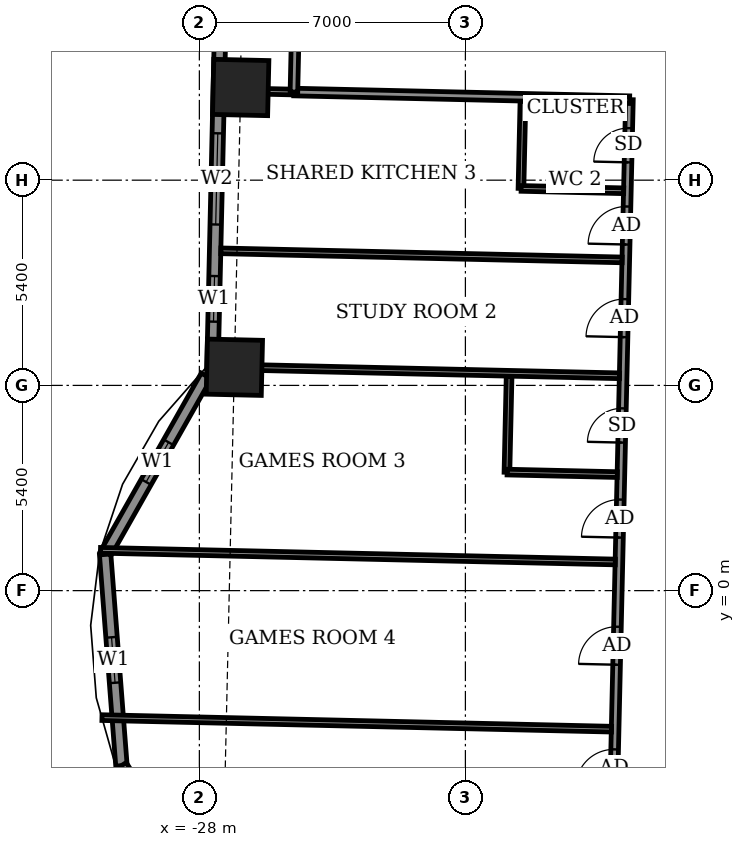
"""IFC4 building model, lengths in metres.
Left out: names, types, materials, properties, quantities, classifications, styles, units other than length and angle.
Written with IfcOpenShell. Run it as: python <this file> out.ifc"""

import sys

from ifc_helpers import new_model, si_unit, direction, frame, frame_2d, origin, origin_2d, place, context, subcontext, project, spatial, rectangle, extrude, element, fill, save


model = new_model("IFC4")
c1 = context("Model", 3, precision=1e-05, world=origin(), true_north=direction((0.0, 1.0)))
c2 = subcontext(c1, "Body", "Model", "MODEL_VIEW")
j1 = project(units=[si_unit("LENGTHUNIT", "METRE"), si_unit("PLANEANGLEUNIT", "RADIAN")], contexts=[c1])
p1 = place(None, origin())
s1 = spatial("IfcSite", under=j1, at=p1, CompositionType="ELEMENT")
p2 = place(p1, origin())
s2 = spatial("IfcBuilding", under=s1, at=p2, CompositionType="ELEMENT")
p3 = place(p2, frame((0.0, 0.0, 71.1)))
s3 = spatial("IfcBuildingStorey", under=s2, at=p3, CompositionType="ELEMENT", Elevation=71.1)
for number, where, z_axis, x_axis in (
    (1, (-26.912, 13.239, -0.55), (0.0, 0.0, 1.0), (-0.023, -1.0, 0.0)),
    (2, (-27.079, 5.877, -0.55), (0.0, 0.0, 1.0), (-0.023, -1.0, 0.0)),
):
    element("IfcColumn", number, at=place(p3, frame(where, z_axis=z_axis, x_axis=x_axis)), inside=s3, PredefinedType="COLUMN", context=c2, shape_type="SweptSolid", body=[
        extrude(rectangle(XDim=1.45, YDim=1.45, at=origin_2d()), origin(), (0.0, 0.0, 1.0), 3.6),
    ])
p4 = place(p3, frame((-27.324, 20.462, 0.0), z_axis=(0.0, 0.0, 1.0), x_axis=(-0.022695628174, -0.999742421057, 0.0)))
e3 = element("IfcWall", 3, at=p4, inside=s3, PredefinedType="SOLIDWALL", context=c2, shape_type="SweptSolid", body=[
    extrude(rectangle(XDim=14.63, YDim=0.3, at=frame_2d((7.315, 0.0))), origin(), (0.0, 0.0, 1.0), 3.05),
])
p5 = place(p4, frame((3.118, 0.0, 0.0)))
e4 = element("IfcOpeningElement", 4, at=p5, cuts=e3, PredefinedType="OPENING", context=c2, shape_type="SweptSolid", body=[
    extrude(rectangle(XDim=1.5, YDim=2.4, at=frame_2d((0.75, 1.2))), frame((0.0, 0.16, 0.0), z_axis=(0.0, -1.0, 0.0), x_axis=(1.0, 0.0, 0.0)), (0.0, 0.0, 1.0), 0.32),
])
p6 = place(p4, frame((8.431, 0.0, 0.9)))
e5 = element("IfcOpeningElement", 5, at=p6, cuts=e3, PredefinedType="OPENING", context=c2, shape_type="SweptSolid", body=[
    extrude(rectangle(XDim=2.4, YDim=1.5, at=frame_2d((1.2, 0.75))), frame((0.0, 0.16, 0.0), z_axis=(0.0, -1.0, 0.0), x_axis=(1.0, 0.0, 0.0)), (0.0, 0.0, 1.0), 0.32),
])
p7 = place(p4, frame((12.188, 0.0, 0.9)))
e6 = element("IfcOpeningElement", 6, at=p7, cuts=e3, PredefinedType="OPENING", context=c2, shape_type="SweptSolid", body=[
    extrude(rectangle(XDim=1.2, YDim=1.5, at=frame_2d((0.6, 0.75))), frame((0.0, 0.16, 0.0), z_axis=(0.0, -1.0, 0.0), x_axis=(1.0, 0.0, 0.0)), (0.0, 0.0, 1.0), 0.32),
])
p8 = place(p3, frame((-27.82, 5.65, 0.0), z_axis=(0.0, 0.0, 1.0), x_axis=(-0.492554919955, -0.870281363025, 0.0)))
e7 = element("IfcWall", 7, at=p8, inside=s3, PredefinedType="SOLIDWALL", context=c2, shape_type="SweptSolid", body=[
    extrude(rectangle(XDim=5.398, YDim=0.3, at=frame_2d((2.699, 0.0))), origin(), (0.0, 0.0, 1.0), 3.05),
])
p9 = place(p8, frame((2.008, 0.0, 0.9)))
e8 = element("IfcOpeningElement", 8, at=p9, cuts=e7, PredefinedType="OPENING", context=c2, shape_type="SweptSolid", body=[
    extrude(rectangle(XDim=1.2, YDim=1.5, at=frame_2d((0.6, 0.75))), frame((0.0, 0.16, 0.0), z_axis=(0.0, -1.0, 0.0), x_axis=(1.0, 0.0, 0.0)), (0.0, 0.0, 1.0), 0.32),
])
p10 = place(p3, frame((-30.479, 0.952, 0.0), z_axis=(0.0, 0.0, 1.0), x_axis=(0.076964476481, -0.997033835614, 0.0)))
e9 = element("IfcWall", 9, at=p10, inside=s3, PredefinedType="SOLIDWALL", context=c2, shape_type="SweptSolid", body=[
    extrude(rectangle(XDim=5.573, YDim=0.3, at=frame_2d((2.787, 0.0))), origin(), (0.0, 0.0, 1.0), 3.05),
])
p11 = place(p10, frame((2.186, 0.0, 0.9)))
e10 = element("IfcOpeningElement", 10, at=p11, cuts=e9, PredefinedType="OPENING", context=c2, shape_type="SweptSolid", body=[
    extrude(rectangle(XDim=1.2, YDim=1.5, at=frame_2d((0.6, 0.75))), frame((0.0, 0.16, 0.0), z_axis=(0.0, -1.0, 0.0), x_axis=(1.0, 0.0, 0.0)), (0.0, 0.0, 1.0), 0.32),
])
p12 = place(p3, frame((-30.05, -4.605, 0.0), z_axis=(0.0, 0.0, 1.0), x_axis=(0.540653885242, -0.841245134532, 0.0)))
e11 = element("IfcWall", 11, at=p12, inside=s3, PredefinedType="SOLIDWALL", context=c2, shape_type="SweptSolid", body=[
    extrude(rectangle(XDim=3.57, YDim=0.3, at=frame_2d((1.785, 0.0))), origin(), (0.0, 0.0, 1.0), 3.05),
])
p13 = place(p12, frame((0.338, 0.0, 0.9)))
e12 = element("IfcOpeningElement", 12, at=p13, cuts=e11, PredefinedType="OPENING", context=c2, shape_type="SweptSolid", body=[
    extrude(rectangle(XDim=1.2, YDim=1.5, at=frame_2d((0.6, 0.75))), frame((0.0, 0.16, 0.0), z_axis=(0.0, -1.0, 0.0), x_axis=(1.0, 0.0, 0.0)), (0.0, 0.0, 1.0), 0.32),
])
p14 = place(p3, frame((-30.413, 6.204, 0.0), z_axis=(0.0, 0.0, 1.0), x_axis=(0.022745736617, 0.999741282265, 0.0)))
e13 = element("IfcWall", 13, at=p14, inside=s3, PredefinedType="USERDEFINED", context=c2, shape_type="SweptSolid", body=[
    extrude(rectangle(XDim=3.875, YDim=0.55, at=frame_2d((1.938, 0.0))), origin(), (0.0, 0.0, 1.0), 0.8),
])
p15 = place(p3, frame((-17.287, -13.625, 0.0), z_axis=(0.0, 0.0, 1.0), x_axis=(0.022712214871, 0.999742044377, 0.0)))
e14 = element("IfcWall", 14, at=p15, inside=s3, PredefinedType="PARTITIONING", context=c2, shape_type="SweptSolid", body=[
    extrude(rectangle(XDim=26.551, YDim=0.2, at=frame_2d((13.275, 0.0))), origin(), (0.0, 0.0, 1.0), 3.05),
])
p16 = place(p15, frame((22.738, 0.0, 0.0)))
e15 = element("IfcOpeningElement", 15, at=p16, cuts=e14, PredefinedType="OPENING", context=c2, shape_type="SweptSolid", body=[
    extrude(rectangle(XDim=1.0, YDim=2.1, at=frame_2d((0.5, 1.05))), frame((0.0, 0.11, 0.0), z_axis=(0.0, -1.0, 0.0), x_axis=(1.0, 0.0, 0.0)), (0.0, 0.0, 1.0), 0.22),
])
p17 = place(p15, frame((24.9, 0.0, 0.0)))
e16 = element("IfcOpeningElement", 16, at=p17, cuts=e14, PredefinedType="OPENING", context=c2, shape_type="SweptSolid", body=[
    extrude(rectangle(XDim=0.9, YDim=2.1, at=frame_2d((0.45, 1.05))), frame((0.0, 0.11, 0.0), z_axis=(0.0, -1.0, 0.0), x_axis=(1.0, 0.0, 0.0)), (0.0, 0.0, 1.0), 0.22),
])
p18 = place(p15, frame((20.3, 0.0, 0.0)))
e17 = element("IfcOpeningElement", 17, at=p18, cuts=e14, PredefinedType="OPENING", context=c2, shape_type="SweptSolid", body=[
    extrude(rectangle(XDim=1.0, YDim=2.1, at=frame_2d((0.5, 1.05))), frame((0.0, 0.11, 0.0), z_axis=(0.0, -1.0, 0.0), x_axis=(1.0, 0.0, 0.0)), (0.0, 0.0, 1.0), 0.22),
])
p19 = place(p15, frame((15.025, 0.0, 0.0)))
e18 = element("IfcOpeningElement", 18, at=p19, cuts=e14, PredefinedType="OPENING", context=c2, shape_type="SweptSolid", body=[
    extrude(rectangle(XDim=1.0, YDim=2.1, at=frame_2d((0.5, 1.05))), frame((0.0, 0.11, 0.0), z_axis=(0.0, -1.0, 0.0), x_axis=(1.0, 0.0, 0.0)), (0.0, 0.0, 1.0), 0.22),
])
p20 = place(p15, frame((17.525, 0.0, 0.0)))
e19 = element("IfcOpeningElement", 19, at=p20, cuts=e14, PredefinedType="OPENING", context=c2, shape_type="SweptSolid", body=[
    extrude(rectangle(XDim=0.9, YDim=2.1, at=frame_2d((0.45, 1.05))), frame((0.0, 0.11, 0.0), z_axis=(0.0, -1.0, 0.0), x_axis=(1.0, 0.0, 0.0)), (0.0, 0.0, 1.0), 0.22),
])
p21 = place(p15, frame((11.678, 0.0, 0.0)))
e20 = element("IfcOpeningElement", 20, at=p21, cuts=e14, PredefinedType="OPENING", context=c2, shape_type="SweptSolid", body=[
    extrude(rectangle(XDim=1.0, YDim=2.1, at=frame_2d((0.5, 1.05))), frame((0.0, 0.11, 0.0), z_axis=(0.0, -1.0, 0.0), x_axis=(1.0, 0.0, 0.0)), (0.0, 0.0, 1.0), 0.22),
])
p22 = place(p15, frame((8.45, 0.0, 0.0)))
e21 = element("IfcOpeningElement", 21, at=p22, cuts=e14, PredefinedType="OPENING", context=c2, shape_type="SweptSolid", body=[
    extrude(rectangle(XDim=1.0, YDim=2.1, at=frame_2d((0.5, 1.05))), frame((0.0, 0.11, 0.0), z_axis=(0.0, -1.0, 0.0), x_axis=(1.0, 0.0, 0.0)), (0.0, 0.0, 1.0), 0.22),
])
p23 = place(p15, frame((6.275, 0.0, 0.0)))
e22 = element("IfcOpeningElement", 22, at=p23, cuts=e14, PredefinedType="OPENING", context=c2, shape_type="SweptSolid", body=[
    extrude(rectangle(XDim=0.9, YDim=2.1, at=frame_2d((0.45, 1.05))), frame((0.0, 0.11, 0.0), z_axis=(0.0, -1.0, 0.0), x_axis=(1.0, 0.0, 0.0)), (0.0, 0.0, 1.0), 0.22),
])
p24 = place(p15, frame((1.062, 0.0, 0.0)))
e23 = element("IfcOpeningElement", 23, at=p24, cuts=e14, PredefinedType="OPENING", context=c2, shape_type="SweptSolid", body=[
    extrude(rectangle(XDim=1.0, YDim=2.1, at=frame_2d((0.5, 1.05))), frame((0.0, 0.11, 0.0), z_axis=(0.0, -1.0, 0.0), x_axis=(1.0, 0.0, 0.0)), (0.0, 0.0, 1.0), 0.22),
])
p25 = place(p15, frame((3.875, 0.0, 0.0)))
e24 = element("IfcOpeningElement", 24, at=p25, cuts=e14, PredefinedType="OPENING", context=c2, shape_type="SweptSolid", body=[
    extrude(rectangle(XDim=0.9, YDim=2.1, at=frame_2d((0.45, 1.05))), frame((0.0, 0.11, 0.0), z_axis=(0.0, -1.0, 0.0), x_axis=(1.0, 0.0, 0.0)), (0.0, 0.0, 1.0), 0.22),
])
p26 = place(p3, frame((-30.563, -3.341, 0.0), z_axis=(0.0, 0.0, 1.0), x_axis=(0.999743140217, -0.022663927048, 0.0)))
e25 = element("IfcWall", 25, at=p26, inside=s3, PredefinedType="PARTITIONING", context=c2, shape_type="SweptSolid", body=[
    extrude(rectangle(XDim=13.411, YDim=0.15, at=frame_2d((6.706, 0.0))), origin(), (0.0, 0.0, 1.0), 2.05),
])
p27 = place(p3, frame((-30.602, 1.061, 0.0), z_axis=(0.0, 0.0, 1.0), x_axis=(0.999743108275, -0.022665336016, 0.0)))
e26 = element("IfcWall", 26, at=p27, inside=s3, PredefinedType="PARTITIONING", context=c2, shape_type="SweptSolid", body=[
    extrude(rectangle(XDim=13.551, YDim=0.15, at=frame_2d((6.775, 0.0))), origin(), (0.0, 0.0, 1.0), 2.05),
])
p28 = place(p3, frame((-19.907, 3.114, 0.0), z_axis=(0.0, 0.0, 1.0), x_axis=(0.022523775833, 0.999746307581, 0.0)))
e27 = element("IfcWall", 27, at=p28, inside=s3, PredefinedType="PARTITIONING", context=c2, shape_type="SweptSolid", body=[
    extrude(rectangle(XDim=2.526, YDim=0.15, at=frame_2d((1.263, 0.0))), origin(), (0.0, 0.0, 1.0), 3.05),
])
p29 = place(p3, frame((-19.902, 3.119, 0.0), z_axis=(0.0, 0.0, 1.0), x_axis=(0.999741618182, -0.022730967319, 0.0)))
e28 = element("IfcWall", 28, at=p29, inside=s3, PredefinedType="PARTITIONING", context=c2, shape_type="SweptSolid", body=[
    extrude(rectangle(XDim=2.9, YDim=0.15, at=frame_2d((1.45, 0.0))), origin(), (0.0, 0.0, 1.0), 3.05),
])
p30 = place(p3, frame((-27.505, 5.892, 0.0), z_axis=(0.0, 0.0, 1.0), x_axis=(0.999743990669, -0.022626381091, 0.0)))
e29 = element("IfcWall", 29, at=p30, inside=s3, PredefinedType="PARTITIONING", context=c2, shape_type="SweptSolid", body=[
    extrude(rectangle(XDim=10.563, YDim=0.15, at=frame_2d((5.282, 0.0))), origin(), (0.0, 0.0, 1.0), 3.05),
])
p31 = place(p3, frame((-27.435, 8.941, 0.0), z_axis=(0.0, 0.0, 1.0), x_axis=(0.999743955169, -0.022627949603, 0.0)))
e30 = element("IfcWall", 30, at=p31, inside=s3, PredefinedType="PARTITIONING", context=c2, shape_type="SweptSolid", body=[
    extrude(rectangle(XDim=10.563, YDim=0.15, at=frame_2d((5.281, 0.0))), origin(), (0.0, 0.0, 1.0), 2.55),
])
p32 = place(p3, frame((-19.538, 10.583, 0.0), z_axis=(0.0, 0.0, 1.0), x_axis=(0.022612884682, 0.999744296031, 0.0)))
e31 = element("IfcWall", 31, at=p32, inside=s3, PredefinedType="PARTITIONING", context=c2, shape_type="SweptSolid", body=[
    extrude(rectangle(XDim=2.3, YDim=0.15, at=frame_2d((1.15, 0.0))), origin(), (0.0, 0.0, 1.0), 3.05),
])
p33 = place(p3, frame((-19.533, 10.583, 0.0), z_axis=(0.0, 0.0, 1.0), x_axis=(0.999736155505, -0.022969966847, 0.0)))
e32 = element("IfcWall", 32, at=p33, inside=s3, PredefinedType="PARTITIONING", context=c2, shape_type="SweptSolid", body=[
    extrude(rectangle(XDim=2.7, YDim=0.15, at=frame_2d((1.35, 0.0))), origin(), (0.0, 0.0, 1.0), 3.05),
])
p34 = place(p3, frame((-27.34, 13.16, 0.0), z_axis=(0.0, 0.0, 1.0), x_axis=(0.999748678707, -0.022418283238, 0.0)))
e33 = element("IfcWall", 33, at=p34, inside=s3, PredefinedType="PARTITIONING", context=c2, shape_type="SweptSolid", body=[
    extrude(rectangle(XDim=1.83, YDim=0.15, at=frame_2d((0.915, 0.0))), origin(), (0.0, 0.0, 1.0), 3.05),
])
p35 = place(p3, frame((-25.515, 13.119, 0.0), z_axis=(0.0, 0.0, 1.0), x_axis=(0.999741550249, -0.022733954903, 0.0)))
e34 = element("IfcWall", 34, at=p35, inside=s3, PredefinedType="PARTITIONING", context=c2, shape_type="SweptSolid", body=[
    extrude(rectangle(XDim=8.838, YDim=0.2, at=frame_2d((4.419, 0.0))), origin(), (0.0, 0.0, 1.0), 3.05),
])
p36 = place(p3, frame((-25.512, 13.119, 0.0), z_axis=(0.0, 0.0, 1.0), x_axis=(0.022617910375, 0.999744182344, 0.0)))
e35 = element("IfcWall", 35, at=p36, inside=s3, PredefinedType="PARTITIONING", context=c2, shape_type="SweptSolid", body=[
    extrude(rectangle(XDim=1.5, YDim=0.2, at=frame_2d((0.75, 0.0))), origin(), (0.0, 0.0, 1.0), 3.05),
])
p37 = place(p3, frame((-25.481, 14.619, 0.0), z_axis=(0.0, 0.0, 1.0), x_axis=(0.999742349682, -0.022698772048, 0.0)))
e36 = element("IfcWall", 36, at=p37, inside=s3, PredefinedType="PARTITIONING", context=c2, shape_type="SweptSolid", body=[
    extrude(rectangle(XDim=54.886, YDim=0.2, at=frame_2d((27.443, 0.0))), origin(), (0.0, 0.0, 1.0), 3.05),
])
p38 = place(p37, frame((52.093, 0.0, 0.0)))
e37 = element("IfcOpeningElement", 37, at=p38, cuts=e36, PredefinedType="OPENING", context=c2, shape_type="SweptSolid", body=[
    extrude(rectangle(XDim=1.0, YDim=2.1, at=frame_2d((0.5, 1.05))), frame((0.0, 0.11, 0.0), z_axis=(0.0, -1.0, 0.0), x_axis=(1.0, 0.0, 0.0)), (0.0, 0.0, 1.0), 0.22),
])
p39 = place(p37, frame((46.325, 0.0, 0.0)))
e38 = element("IfcOpeningElement", 38, at=p39, cuts=e36, PredefinedType="OPENING", context=c2, shape_type="SweptSolid", body=[
    extrude(rectangle(XDim=0.9, YDim=2.1, at=frame_2d((0.45, 1.05))), frame((0.0, 0.11, 0.0), z_axis=(0.0, -1.0, 0.0), x_axis=(1.0, 0.0, 0.0)), (0.0, 0.0, 1.0), 0.22),
])
p40 = place(p37, frame((41.275, 0.0, 0.0)))
e39 = element("IfcOpeningElement", 39, at=p40, cuts=e36, PredefinedType="OPENING", context=c2, shape_type="SweptSolid", body=[
    extrude(rectangle(XDim=0.9, YDim=2.1, at=frame_2d((0.45, 1.05))), frame((0.0, 0.11, 0.0), z_axis=(0.0, -1.0, 0.0), x_axis=(1.0, 0.0, 0.0)), (0.0, 0.0, 1.0), 0.22),
])
p41 = place(p37, frame((38.875, 0.0, 0.0)))
e40 = element("IfcOpeningElement", 40, at=p41, cuts=e36, PredefinedType="OPENING", context=c2, shape_type="SweptSolid", body=[
    extrude(rectangle(XDim=0.9, YDim=2.1, at=frame_2d((0.45, 1.05))), frame((0.0, 0.11, 0.0), z_axis=(0.0, -1.0, 0.0), x_axis=(1.0, 0.0, 0.0)), (0.0, 0.0, 1.0), 0.22),
])
p42 = place(p37, frame((31.95, 0.0, 0.0)))
e41 = element("IfcOpeningElement", 41, at=p42, cuts=e36, PredefinedType="OPENING", context=c2, shape_type="SweptSolid", body=[
    extrude(rectangle(XDim=0.9, YDim=2.1, at=frame_2d((0.45, 1.05))), frame((0.0, 0.11, 0.0), z_axis=(0.0, -1.0, 0.0), x_axis=(1.0, 0.0, 0.0)), (0.0, 0.0, 1.0), 0.22),
])
p43 = place(p37, frame((29.8, 0.0, 0.0)))
e42 = element("IfcOpeningElement", 42, at=p43, cuts=e36, PredefinedType="OPENING", context=c2, shape_type="SweptSolid", body=[
    extrude(rectangle(XDim=0.9, YDim=2.1, at=frame_2d((0.45, 1.05))), frame((0.0, 0.11, 0.0), z_axis=(0.0, -1.0, 0.0), x_axis=(1.0, 0.0, 0.0)), (0.0, 0.0, 1.0), 0.22),
])
p44 = place(p37, frame((22.875, 0.0, 0.0)))
e43 = element("IfcOpeningElement", 43, at=p44, cuts=e36, PredefinedType="OPENING", context=c2, shape_type="SweptSolid", body=[
    extrude(rectangle(XDim=0.9, YDim=2.1, at=frame_2d((0.45, 1.05))), frame((0.0, 0.11, 0.0), z_axis=(0.0, -1.0, 0.0), x_axis=(1.0, 0.0, 0.0)), (0.0, 0.0, 1.0), 0.22),
])
p45 = place(p37, frame((20.675, 0.0, 0.0)))
e44 = element("IfcOpeningElement", 44, at=p45, cuts=e36, PredefinedType="OPENING", context=c2, shape_type="SweptSolid", body=[
    extrude(rectangle(XDim=0.9, YDim=2.1, at=frame_2d((0.45, 1.05))), frame((0.0, 0.11, 0.0), z_axis=(0.0, -1.0, 0.0), x_axis=(1.0, 0.0, 0.0)), (0.0, 0.0, 1.0), 0.22),
])
p46 = place(p37, frame((13.525, 0.0, 0.0)))
e45 = element("IfcOpeningElement", 45, at=p46, cuts=e36, PredefinedType="OPENING", context=c2, shape_type="SweptSolid", body=[
    extrude(rectangle(XDim=0.9, YDim=2.1, at=frame_2d((0.45, 1.05))), frame((0.0, 0.11, 0.0), z_axis=(0.0, -1.0, 0.0), x_axis=(1.0, 0.0, 0.0)), (0.0, 0.0, 1.0), 0.22),
])
p47 = place(p37, frame((11.275, 0.0, 0.0)))
e46 = element("IfcOpeningElement", 46, at=p47, cuts=e36, PredefinedType="OPENING", context=c2, shape_type="SweptSolid", body=[
    extrude(rectangle(XDim=0.9, YDim=2.1, at=frame_2d((0.45, 1.05))), frame((0.0, 0.11, 0.0), z_axis=(0.0, -1.0, 0.0), x_axis=(1.0, 0.0, 0.0)), (0.0, 0.0, 1.0), 0.22),
])
p48 = place(p37, frame((3.079, 0.0, 0.0)))
e47 = element("IfcOpeningElement", 47, at=p48, cuts=e36, PredefinedType="OPENING", context=c2, shape_type="SweptSolid", body=[
    extrude(rectangle(XDim=1.0, YDim=2.1, at=frame_2d((0.5, 1.05))), frame((0.0, 0.11, 0.0), z_axis=(0.0, -1.0, 0.0), x_axis=(1.0, 0.0, 0.0)), (0.0, 0.0, 1.0), 0.22),
])
p49 = place(p6, origin())
e48 = element("IfcWindow", 48, at=p49, inside=s3, PartitioningType="DOUBLE_PANEL_VERTICAL", PredefinedType="WINDOW", context=c2, shape_type="SweptSolid", body=[
    extrude(rectangle(XDim=2.4, YDim=1.5, at=frame_2d((1.2, 0.75))), frame((0.0, 0.03, 0.0), z_axis=(0.0, -1.0, 0.0), x_axis=(1.0, 0.0, 0.0)), (0.0, 0.0, 1.0), 0.06),
])
fill(e5, e48)
p50 = place(p7, origin())
e49 = element("IfcWindow", 49, at=p50, inside=s3, PartitioningType="SINGLE_PANEL", PredefinedType="WINDOW", context=c2, shape_type="SweptSolid", body=[
    extrude(rectangle(XDim=1.2, YDim=1.5, at=frame_2d((0.6, 0.75))), frame((0.0, 0.03, 0.0), z_axis=(0.0, -1.0, 0.0), x_axis=(1.0, 0.0, 0.0)), (0.0, 0.0, 1.0), 0.06),
])
fill(e6, e49)
p51 = place(p9, origin())
e50 = element("IfcWindow", 50, at=p51, inside=s3, PartitioningType="SINGLE_PANEL", PredefinedType="WINDOW", context=c2, shape_type="SweptSolid", body=[
    extrude(rectangle(XDim=1.2, YDim=1.5, at=frame_2d((0.6, 0.75))), frame((0.0, 0.03, 0.0), z_axis=(0.0, -1.0, 0.0), x_axis=(1.0, 0.0, 0.0)), (0.0, 0.0, 1.0), 0.06),
])
fill(e8, e50)
p52 = place(p11, origin())
e51 = element("IfcWindow", 51, at=p52, inside=s3, PartitioningType="SINGLE_PANEL", PredefinedType="WINDOW", context=c2, shape_type="SweptSolid", body=[
    extrude(rectangle(XDim=1.2, YDim=1.5, at=frame_2d((0.6, 0.75))), frame((0.0, 0.03, 0.0), z_axis=(0.0, -1.0, 0.0), x_axis=(1.0, 0.0, 0.0)), (0.0, 0.0, 1.0), 0.06),
])
fill(e10, e51)
p53 = place(p16, origin())
e52 = element("IfcDoor", 52, at=p53, inside=s3, OperationType="SINGLE_SWING_LEFT", PredefinedType="DOOR", context=c2, shape_type="SweptSolid", body=[
    extrude(rectangle(XDim=1.0, YDim=2.1, at=frame_2d((0.5, 1.05))), frame((0.0, 0.025, 0.0), z_axis=(0.0, -1.0, 0.0), x_axis=(1.0, 0.0, 0.0)), (0.0, 0.0, 1.0), 0.05),
])
fill(e15, e52)
p54 = place(p17, origin())
e53 = element("IfcDoor", 53, at=p54, inside=s3, OperationType="SINGLE_SWING_LEFT", PredefinedType="DOOR", context=c2, shape_type="SweptSolid", body=[
    extrude(rectangle(XDim=0.9, YDim=2.1, at=frame_2d((0.45, 1.05))), frame((0.0, 0.025, 0.0), z_axis=(0.0, -1.0, 0.0), x_axis=(1.0, 0.0, 0.0)), (0.0, 0.0, 1.0), 0.05),
])
fill(e16, e53)
p55 = place(p18, origin())
e54 = element("IfcDoor", 54, at=p55, inside=s3, OperationType="SINGLE_SWING_RIGHT", PredefinedType="DOOR", context=c2, shape_type="SweptSolid", body=[
    extrude(rectangle(XDim=1.0, YDim=2.1, at=frame_2d((0.5, 1.05))), frame((0.0, 0.025, 0.0), z_axis=(0.0, -1.0, 0.0), x_axis=(1.0, 0.0, 0.0)), (0.0, 0.0, 1.0), 0.05),
])
fill(e17, e54)
p56 = place(p19, origin())
e55 = element("IfcDoor", 55, at=p56, inside=s3, OperationType="SINGLE_SWING_LEFT", PredefinedType="DOOR", context=c2, shape_type="SweptSolid", body=[
    extrude(rectangle(XDim=1.0, YDim=2.1, at=frame_2d((0.5, 1.05))), frame((0.0, 0.025, 0.0), z_axis=(0.0, -1.0, 0.0), x_axis=(1.0, 0.0, 0.0)), (0.0, 0.0, 1.0), 0.05),
])
fill(e18, e55)
p57 = place(p20, origin())
e56 = element("IfcDoor", 56, at=p57, inside=s3, OperationType="SINGLE_SWING_RIGHT", PredefinedType="DOOR", context=c2, shape_type="SweptSolid", body=[
    extrude(rectangle(XDim=0.9, YDim=2.1, at=frame_2d((0.45, 1.05))), frame((0.0, 0.025, 0.0), z_axis=(0.0, -1.0, 0.0), x_axis=(1.0, 0.0, 0.0)), (0.0, 0.0, 1.0), 0.05),
])
fill(e19, e56)
p58 = place(p21, origin())
e57 = element("IfcDoor", 57, at=p58, inside=s3, OperationType="SINGLE_SWING_RIGHT", PredefinedType="DOOR", context=c2, shape_type="SweptSolid", body=[
    extrude(rectangle(XDim=1.0, YDim=2.1, at=frame_2d((0.5, 1.05))), frame((0.0, 0.025, 0.0), z_axis=(0.0, -1.0, 0.0), x_axis=(1.0, 0.0, 0.0)), (0.0, 0.0, 1.0), 0.05),
])
fill(e20, e57)
p59 = place(p22, origin())
e58 = element("IfcDoor", 58, at=p59, inside=s3, OperationType="SINGLE_SWING_LEFT", PredefinedType="DOOR", context=c2, shape_type="SweptSolid", body=[
    extrude(rectangle(XDim=1.0, YDim=2.1, at=frame_2d((0.5, 1.05))), frame((0.0, 0.025, 0.0), z_axis=(0.0, -1.0, 0.0), x_axis=(1.0, 0.0, 0.0)), (0.0, 0.0, 1.0), 0.05),
])
fill(e21, e58)
save(model, sys.argv[1])
